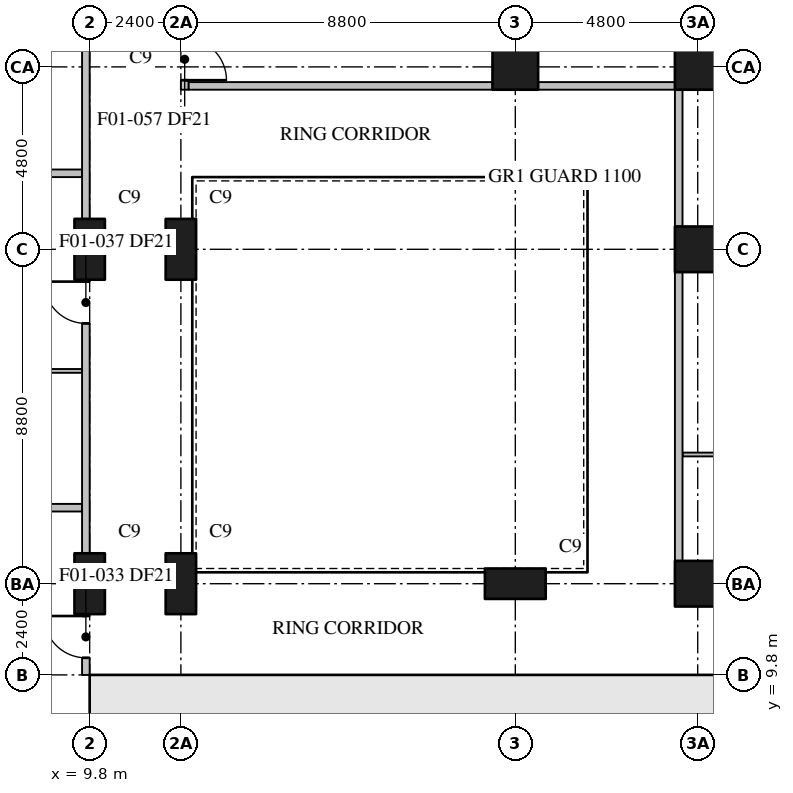
"""IFC4 building model, lengths in metres.
Left out: names, types, materials, properties, quantities, classifications, styles, units other than length and angle.
Written with IfcOpenShell. Run it as: python <this file> out.ifc"""

import sys

from ifc_helpers import new_model, si_unit, direction, frame, frame_2d, origin, origin_2d, place, context, subcontext, project, spatial, rectangle, extrude, element, fill, save


model = new_model("IFC4")
c1 = context("Model", 3, precision=1e-05, world=origin(), true_north=direction((0.0, 1.0)))
c2 = subcontext(c1, "Body", "Model", "MODEL_VIEW")
j1 = project(units=[si_unit("LENGTHUNIT", "METRE"), si_unit("PLANEANGLEUNIT", "RADIAN")], contexts=[c1])
p1 = place(None, origin())
s1 = spatial("IfcSite", under=j1, at=p1, CompositionType="ELEMENT")
p2 = place(p1, origin())
s2 = spatial("IfcBuilding", under=s1, at=p2, CompositionType="ELEMENT")
p3 = place(p2, frame((0.0, 0.0, 37.7)))
s3 = spatial("IfcBuildingStorey", under=s2, at=p3, CompositionType="ELEMENT", Elevation=37.7)
for number, where, z_axis, x_axis in (
    (1, (9.8, 12.2, 0.0), (0.0, 0.0, 1.0), (0.0, 1.0, 0.0)),
    (2, (9.8, 21.0, 0.0), (0.0, 0.0, 1.0), (0.0, 1.0, 0.0)),
    (3, (12.2, 12.2, 0.0), (0.0, 0.0, 1.0), (0.0, 1.0, 0.0)),
    (4, (12.2, 21.0, 0.0), (0.0, 0.0, 1.0), (0.0, 1.0, 0.0)),
    (5, (21.0, 12.2, 0.0), (0.0, 0.0, 1.0), (1.0, 0.0, 0.0)),
):
    element("IfcColumn", number, at=place(p3, frame(where, z_axis=z_axis, x_axis=x_axis)), inside=s3, PredefinedType="COLUMN", context=c2, shape_type="SweptSolid", body=[
        extrude(rectangle(XDim=1.6, YDim=0.8, at=origin_2d()), origin(), (0.0, 0.0, 1.0), 3.7),
    ])
for number, where, z_axis, x_axis in (
    (6, (21.0, 25.8, 0.0), (0.0, 0.0, 1.0), (1.0, 0.0, 0.0)),
    (7, (25.8, 12.2, 0.0), (0.0, 0.0, 1.0), (1.0, 0.0, 0.0)),
    (8, (25.8, 21.0, 0.0), (0.0, 0.0, 1.0), (1.0, 0.0, 0.0)),
    (9, (25.8, 25.8, 0.0), (0.0, 0.0, 1.0), (1.0, 0.0, 0.0)),
):
    element("IfcColumn", number, at=place(p3, frame(where, z_axis=z_axis, x_axis=x_axis)), inside=s3, PredefinedType="COLUMN", context=c2, shape_type="SweptSolid", body=[
        extrude(rectangle(XDim=1.2, YDim=1.2, at=origin_2d()), origin(), (0.0, 0.0, 1.0), 3.7),
    ])
p4 = place(p3, frame((10.5, 1.2, 0.0), z_axis=(0.0, 0.0, 1.0), x_axis=(0.0, 1.0, 0.0)))
e10 = element("IfcWall", 10, at=p4, inside=s3, PredefinedType="SHEAR", context=c2, shape_type="SweptSolid", body=[
    extrude(rectangle(XDim=8.6, YDim=1.0, at=frame_2d((4.3, 0.0))), origin(), (0.0, 0.0, 1.0), 3.7),
])
p5 = place(p3, frame((9.8, 9.6, 0.0), z_axis=(0.0, 0.0, 1.0), x_axis=(1.0, 0.0, 0.0)))
e11 = element("IfcWall", 11, at=p5, inside=s3, PredefinedType="SHEAR", context=c2, shape_type="SweptSolid", body=[
    extrude(rectangle(XDim=4.3, YDim=0.4, at=frame_2d((2.15, 0.0))), origin(), (0.0, 0.0, 1.0), 3.7),
])
p6 = place(p5, frame((2.05, 0.0, 0.0)))
e12 = element("IfcOpeningElement", 12, at=p6, cuts=e11, PredefinedType="OPENING", context=c2, shape_type="SweptSolid", body=[
    extrude(rectangle(XDim=1.2, YDim=2.1, at=frame_2d((0.6, 1.05))), frame((0.0, 0.21, 0.0), z_axis=(0.0, -1.0, 0.0), x_axis=(1.0, 0.0, 0.0)), (0.0, 0.0, 1.0), 0.42),
])
p7 = place(p3, frame((14.1, 9.6, 0.0), z_axis=(0.0, 0.0, 1.0), x_axis=(1.0, 0.0, 0.0)))
e13 = element("IfcWall", 13, at=p7, inside=s3, PredefinedType="SHEAR", context=c2, shape_type="SweptSolid", body=[
    extrude(rectangle(XDim=10.4, YDim=0.4, at=frame_2d((5.2, 0.0))), origin(), (0.0, 0.0, 1.0), 3.7),
])
p8 = place(p7, frame((0.8, 0.0, 0.0)))
e14 = element("IfcOpeningElement", 14, at=p8, cuts=e13, PredefinedType="OPENING", context=c2, shape_type="SweptSolid", body=[
    extrude(rectangle(XDim=1.0, YDim=2.1, at=frame_2d((0.5, 1.05))), frame((0.0, 0.21, 0.0), z_axis=(0.0, -1.0, 0.0), x_axis=(1.0, 0.0, 0.0)), (0.0, 0.0, 1.0), 0.42),
])
p9 = place(p7, frame((8.65, 0.0, 0.0)))
e15 = element("IfcOpeningElement", 15, at=p9, cuts=e13, PredefinedType="OPENING", context=c2, shape_type="SweptSolid", body=[
    extrude(rectangle(XDim=0.9, YDim=2.1, at=frame_2d((0.45, 1.05))), frame((0.0, 0.21, 0.0), z_axis=(0.0, -1.0, 0.0), x_axis=(1.0, 0.0, 0.0)), (0.0, 0.0, 1.0), 0.42),
])
p10 = place(p3, frame((14.1, 1.2, 0.0), z_axis=(0.0, 0.0, 1.0), x_axis=(0.0, 1.0, 0.0)))
e16 = element("IfcWall", 16, at=p10, inside=s3, PredefinedType="SHEAR", context=c2, shape_type="SweptSolid", body=[
    extrude(rectangle(XDim=8.4, YDim=0.4, at=frame_2d((4.2, 0.0))), origin(), (0.0, 0.0, 1.0), 3.7),
])
p11 = place(p10, frame((4.45, 0.0, 0.0)))
e17 = element("IfcOpeningElement", 17, at=p11, cuts=e16, PredefinedType="OPENING", context=c2, shape_type="SweptSolid", body=[
    extrude(rectangle(XDim=0.9, YDim=2.1, at=frame_2d((0.45, 1.05))), frame((0.0, 0.21, 0.0), z_axis=(0.0, -1.0, 0.0), x_axis=(1.0, 0.0, 0.0)), (0.0, 0.0, 1.0), 0.42),
])
p12 = place(p3, frame((24.5, 7.0, 0.0), z_axis=(0.0, 0.0, 1.0), x_axis=(0.0, 1.0, 0.0)))
e18 = element("IfcWall", 18, at=p12, inside=s3, PredefinedType="SHEAR", context=c2, shape_type="SweptSolid", body=[
    extrude(rectangle(XDim=2.4, YDim=0.25, at=frame_2d((1.2, 0.0))), origin(), (0.0, 0.0, 1.0), 3.7),
])
p13 = place(p3, frame((21.9, 7.0, 0.0), z_axis=(0.0, 0.0, 1.0), x_axis=(0.0, 1.0, 0.0)))
e19 = element("IfcWall", 19, at=p13, inside=s3, PredefinedType="PARTITIONING", context=c2, shape_type="SweptSolid", body=[
    extrude(rectangle(XDim=2.4, YDim=0.15, at=frame_2d((1.2, 0.0))), origin(), (0.0, 0.0, 1.0), 3.4),
])
p14 = place(p3, frame((25.3, 12.8, 0.0), z_axis=(0.0, 0.0, 1.0), x_axis=(0.0, 1.0, 0.0)))
e20 = element("IfcWall", 20, at=p14, inside=s3, PredefinedType="PARTITIONING", context=c2, shape_type="SweptSolid", body=[
    extrude(rectangle(XDim=7.6, YDim=0.2, at=frame_2d((3.8, 0.0))), origin(), (0.0, 0.0, 1.0), 3.4),
])
p15 = place(p3, frame((25.3, 21.6, 0.0), z_axis=(0.0, 0.0, 1.0), x_axis=(0.0, 1.0, 0.0)))
e21 = element("IfcWall", 21, at=p15, inside=s3, PredefinedType="PARTITIONING", context=c2, shape_type="SweptSolid", body=[
    extrude(rectangle(XDim=3.6, YDim=0.2, at=frame_2d((1.8, 0.0))), origin(), (0.0, 0.0, 1.0), 3.4),
])
p16 = place(p3, frame((9.7, 9.8, 0.0), z_axis=(0.0, 0.0, 1.0), x_axis=(0.0, 1.0, 0.0)))
e22 = element("IfcWall", 22, at=p16, inside=s3, PredefinedType="PARTITIONING", context=c2, shape_type="SweptSolid", body=[
    extrude(rectangle(XDim=1.6, YDim=0.2, at=frame_2d((0.8, 0.0))), origin(), (0.0, 0.0, 1.0), 3.4),
])
p17 = place(p16, frame((0.45, 0.0, 0.0)))
e23 = element("IfcOpeningElement", 23, at=p17, cuts=e22, PredefinedType="OPENING", context=c2, shape_type="SweptSolid", body=[
    extrude(rectangle(XDim=1.1, YDim=2.1, at=frame_2d((0.55, 1.05))), frame((0.0, 0.11, 0.0), z_axis=(0.0, -1.0, 0.0), x_axis=(1.0, 0.0, 0.0)), (0.0, 0.0, 1.0), 0.22),
])
p18 = place(p3, frame((9.7, 13.0, 0.0), z_axis=(0.0, 0.0, 1.0), x_axis=(0.0, 1.0, 0.0)))
e24 = element("IfcWall", 24, at=p18, inside=s3, PredefinedType="PARTITIONING", context=c2, shape_type="SweptSolid", body=[
    extrude(rectangle(XDim=7.2, YDim=0.2, at=frame_2d((3.6, 0.0))), origin(), (0.0, 0.0, 1.0), 3.4),
])
p19 = place(p18, frame((6.05, 0.0, 0.0)))
e25 = element("IfcOpeningElement", 25, at=p19, cuts=e24, PredefinedType="OPENING", context=c2, shape_type="SweptSolid", body=[
    extrude(rectangle(XDim=1.1, YDim=2.1, at=frame_2d((0.55, 1.05))), frame((0.0, 0.11, 0.0), z_axis=(0.0, -1.0, 0.0), x_axis=(1.0, 0.0, 0.0)), (0.0, 0.0, 1.0), 0.22),
])
p20 = place(p3, frame((9.7, 21.8, 0.0), z_axis=(0.0, 0.0, 1.0), x_axis=(0.0, 1.0, 0.0)))
e26 = element("IfcWall", 26, at=p20, inside=s3, PredefinedType="PARTITIONING", context=c2, shape_type="SweptSolid", body=[
    extrude(rectangle(XDim=4.8, YDim=0.2, at=frame_2d((2.4, 0.0))), origin(), (0.0, 0.0, 1.0), 3.4),
])
for number, where, z_axis, x_axis in (
    (27, (0.31, 14.2, 0.0), (0.0, 0.0, 1.0), (1.0, 0.0, 0.0)),
    (28, (0.31, 23.0, 0.0), (0.0, 0.0, 1.0), (1.0, 0.0, 0.0)),
):
    element("IfcWall", number, at=place(p3, frame(where, z_axis=z_axis, x_axis=x_axis)), inside=s3, PredefinedType="PARTITIONING", context=c2, shape_type="SweptSolid", body=[
        extrude(rectangle(XDim=9.29, YDim=0.2, at=frame_2d((4.645, 0.0))), origin(), (0.0, 0.0, 1.0), 3.4),
    ])
p21 = place(p3, frame((12.3, 26.6, 0.0), z_axis=(0.0, 0.0, 1.0), x_axis=(0.0, -1.0, 0.0)))
e29 = element("IfcWall", 29, at=p21, inside=s3, PredefinedType="PARTITIONING", context=c2, shape_type="SweptSolid", body=[
    extrude(rectangle(XDim=1.4, YDim=0.2, at=frame_2d((0.7, 0.0))), origin(), (0.0, 0.0, 1.0), 3.4),
])
p22 = place(p21, frame((0.05, 0.0, 0.0)))
e30 = element("IfcOpeningElement", 30, at=p22, cuts=e29, PredefinedType="OPENING", context=c2, shape_type="SweptSolid", body=[
    extrude(rectangle(XDim=1.1, YDim=2.1, at=frame_2d((0.55, 1.05))), frame((0.0, 0.11, 0.0), z_axis=(0.0, -1.0, 0.0), x_axis=(1.0, 0.0, 0.0)), (0.0, 0.0, 1.0), 0.22),
])
p23 = place(p3, frame((12.4, 25.3, 0.0), z_axis=(0.0, 0.0, 1.0), x_axis=(1.0, 0.0, 0.0)))
e31 = element("IfcWall", 31, at=p23, inside=s3, PredefinedType="PARTITIONING", context=c2, shape_type="SweptSolid", body=[
    extrude(rectangle(XDim=8.0, YDim=0.2, at=frame_2d((4.0, 0.0))), origin(), (0.0, 0.0, 1.0), 3.4),
])
p24 = place(p3, frame((21.6, 25.3, 0.0), z_axis=(0.0, 0.0, 1.0), x_axis=(1.0, 0.0, 0.0)))
e32 = element("IfcWall", 32, at=p24, inside=s3, PredefinedType="PARTITIONING", context=c2, shape_type="SweptSolid", body=[
    extrude(rectangle(XDim=3.6, YDim=0.2, at=frame_2d((1.8, 0.0))), origin(), (0.0, 0.0, 1.0), 3.4),
])
p25 = place(p3, frame((25.4, 15.6, 0.0), z_axis=(0.0, 0.0, 1.0), x_axis=(1.0, 0.0, 0.0)))
e33 = element("IfcWall", 33, at=p25, inside=s3, PredefinedType="PARTITIONING", context=c2, shape_type="SweptSolid", body=[
    extrude(rectangle(XDim=3.45, YDim=0.1, at=frame_2d((1.725, 0.0))), origin(), (0.0, 0.0, 1.0), 3.4),
])
p26 = place(p3, frame((9.6, 17.8, 0.0), z_axis=(0.0, 0.0, 1.0), x_axis=(-1.0, 0.0, 0.0)))
e34 = element("IfcWall", 34, at=p26, inside=s3, PredefinedType="PARTITIONING", context=c2, shape_type="SweptSolid", body=[
    extrude(rectangle(XDim=3.15, YDim=0.1, at=frame_2d((1.575, 0.0))), origin(), (0.0, 0.0, 1.0), 3.4),
])
p27 = place(p26, frame((1.05, 0.0, 0.0)))
e35 = element("IfcOpeningElement", 35, at=p27, cuts=e34, PredefinedType="OPENING", context=c2, shape_type="SweptSolid", body=[
    extrude(rectangle(XDim=0.9, YDim=2.1, at=frame_2d((0.45, 1.05))), frame((0.0, 0.06, 0.0), z_axis=(0.0, -1.0, 0.0), x_axis=(1.0, 0.0, 0.0)), (0.0, 0.0, 1.0), 0.12),
])
p28 = place(p8, frame((1.0, 0.0, 0.0), z_axis=(0.0, 0.0, 1.0), x_axis=(-1.0, 0.0, 0.0)))
e36 = element("IfcDoor", 36, at=p28, inside=s3, OperationType="SINGLE_SWING_RIGHT", PredefinedType="DOOR", context=c2, shape_type="SweptSolid", body=[
    extrude(rectangle(XDim=1.0, YDim=2.1, at=frame_2d((0.5, 1.05))), frame((0.0, 0.025, 0.0), z_axis=(0.0, -1.0, 0.0), x_axis=(1.0, 0.0, 0.0)), (0.0, 0.0, 1.0), 0.05),
])
fill(e14, e36)
p29 = place(p9, frame((0.9, 0.0, 0.0), z_axis=(0.0, 0.0, 1.0), x_axis=(-1.0, 0.0, 0.0)))
e37 = element("IfcDoor", 37, at=p29, inside=s3, OperationType="SINGLE_SWING_LEFT", PredefinedType="DOOR", context=c2, shape_type="SweptSolid", body=[
    extrude(rectangle(XDim=0.9, YDim=2.1, at=frame_2d((0.45, 1.05))), frame((0.0, 0.025, 0.0), z_axis=(0.0, -1.0, 0.0), x_axis=(1.0, 0.0, 0.0)), (0.0, 0.0, 1.0), 0.05),
])
fill(e15, e37)
p30 = place(p6, frame((1.2, 0.0, 0.0), z_axis=(0.0, 0.0, 1.0), x_axis=(-1.0, 0.0, 0.0)))
e38 = element("IfcDoor", 38, at=p30, inside=s3, OperationType="SINGLE_SWING_LEFT", PredefinedType="DOOR", context=c2, shape_type="SweptSolid", body=[
    extrude(rectangle(XDim=1.2, YDim=2.1, at=frame_2d((0.6, 1.05))), frame((0.0, 0.025, 0.0), z_axis=(0.0, -1.0, 0.0), x_axis=(1.0, 0.0, 0.0)), (0.0, 0.0, 1.0), 0.05),
])
fill(e12, e38)
p31 = place(p17, origin())
e39 = element("IfcDoor", 39, at=p31, inside=s3, OperationType="SINGLE_SWING_RIGHT", PredefinedType="DOOR", context=c2, shape_type="SweptSolid", body=[
    extrude(rectangle(XDim=1.1, YDim=2.1, at=frame_2d((0.55, 1.05))), frame((0.0, 0.025, 0.0), z_axis=(0.0, -1.0, 0.0), x_axis=(1.0, 0.0, 0.0)), (0.0, 0.0, 1.0), 0.05),
])
fill(e23, e39)
p32 = place(p19, origin())
e40 = element("IfcDoor", 40, at=p32, inside=s3, OperationType="SINGLE_SWING_RIGHT", PredefinedType="DOOR", context=c2, shape_type="SweptSolid", body=[
    extrude(rectangle(XDim=1.1, YDim=2.1, at=frame_2d((0.55, 1.05))), frame((0.0, 0.025, 0.0), z_axis=(0.0, -1.0, 0.0), x_axis=(1.0, 0.0, 0.0)), (0.0, 0.0, 1.0), 0.05),
])
fill(e25, e40)
p33 = place(p22, origin())
e41 = element("IfcDoor", 41, at=p33, inside=s3, OperationType="SINGLE_SWING_RIGHT", PredefinedType="DOOR", context=c2, shape_type="SweptSolid", body=[
    extrude(rectangle(XDim=1.1, YDim=2.1, at=frame_2d((0.55, 1.05))), frame((0.0, 0.025, 0.0), z_axis=(0.0, -1.0, 0.0), x_axis=(1.0, 0.0, 0.0)), (0.0, 0.0, 1.0), 0.05),
])
fill(e30, e41)
save(model, sys.argv[1])
